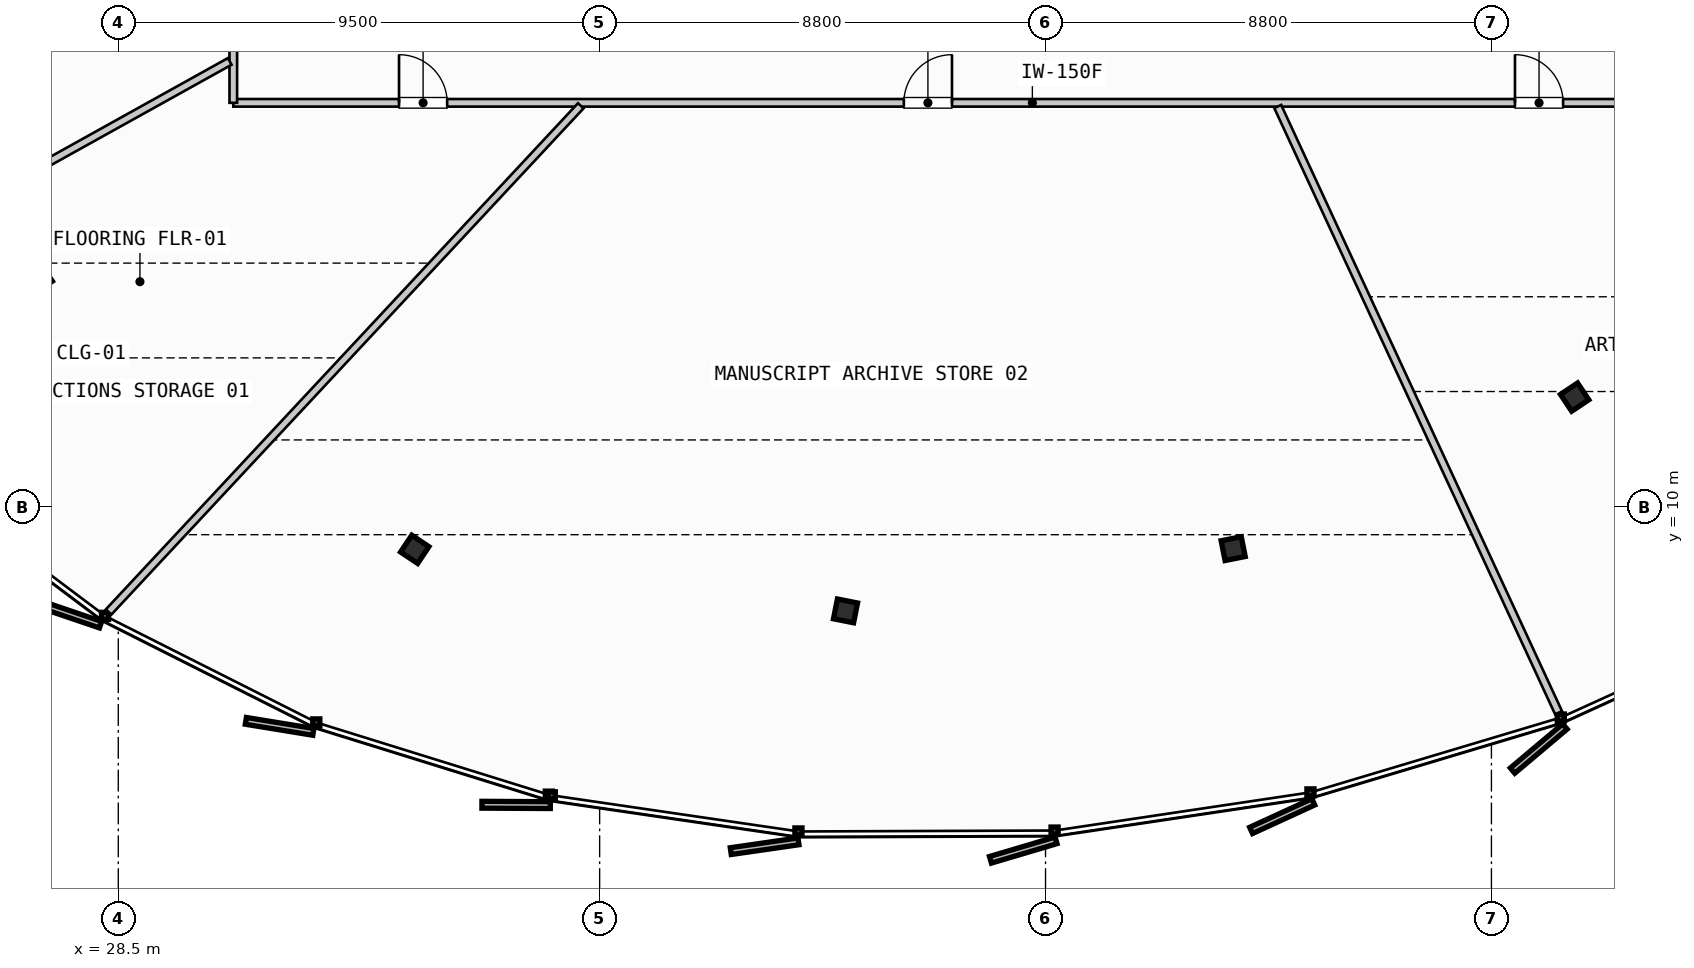
"""IFC4 building model, lengths in metres.
Left out: names, types, materials, properties, quantities, classifications, styles, units other than length and angle.
Written with IfcOpenShell. Run it as: python <this file> out.ifc"""

import sys

from ifc_helpers import new_model, si_unit, direction, frame, frame_2d, origin, origin_2d, place, context, subcontext, project, spatial, rectangle, i_section, extrude, source, transform, mapped, element, fill, save


model = new_model("IFC4")
c1 = context("Model", 3, precision=1e-05, world=origin(), true_north=direction((0.0, 1.0)))
c2 = subcontext(c1, "Body", "Model", "MODEL_VIEW")
j1 = project(units=[si_unit("LENGTHUNIT", "METRE"), si_unit("PLANEANGLEUNIT", "RADIAN")], contexts=[c1])
p1 = place(None, origin())
s1 = spatial("IfcSite", under=j1, at=p1, CompositionType="ELEMENT")
p2 = place(p1, origin())
s2 = spatial("IfcBuilding", under=s1, at=p2, CompositionType="ELEMENT")
p3 = place(p2, frame((0.0, 0.0, 85.6)))
s3 = spatial("IfcBuildingStorey", under=s2, at=p3, CompositionType="ELEMENT", Elevation=85.6)
m1 = source(origin(), c2, "Body", "SweptSolid", [
    extrude(i_section(OverallWidth=0.405, OverallDepth=0.398, WebThickness=0.035, FlangeThickness=0.056, FilletRadius=0.015, at=origin_2d()), origin(), (0.0, 0.0, 1.0), 3.35),
])
for number, where, z_axis, x_axis in (
    (1, (26.921, 14.517, 0.0), (0.0, 0.0, 1.0), (-0.831, -0.556, 0.0)),
    (2, (34.351, 9.168, 0.0), (0.0, 0.0, 1.0), (-0.556, -0.831, 0.0)),
    (3, (42.852, 7.954, 0.0), (0.0, 0.0, 1.0), (-0.195, -0.981, 0.0)),
    (4, (50.503, 9.182, 0.0), (0.0, 0.0, 1.0), (0.195, -0.981, 0.0)),
    (5, (57.242, 12.172, 0.0), (0.0, 0.0, 1.0), (0.556, -0.831, 0.0)),
):
    element("IfcColumn", number, at=place(p3, frame(where, z_axis=z_axis, x_axis=x_axis)), inside=s3, PredefinedType="COLUMN", context=c2, shape_type="MappedRepresentation", body=[
        mapped(m1, transform((0.0, 0.0, 0.0), scale=1.0)),
    ])
p4 = place(p3, frame((30.77, 17.98, 0.0), z_axis=(0.0, 0.0, 1.0), x_axis=(1.0, 0.0, 0.0)))
e6 = element("IfcWall", 6, at=p4, inside=s3, PredefinedType="PARTITIONING", context=c2, shape_type="SweptSolid", body=[
    extrude(rectangle(XDim=31.54, YDim=0.15, at=frame_2d((15.77, 0.0))), origin(), (0.0, 0.0, 1.0), 2.28),
])
p5 = place(p4, frame((3.271, 0.0, 0.0)))
e7 = element("IfcOpeningElement", 7, at=p5, cuts=e6, PredefinedType="OPENING", context=c2, shape_type="SweptSolid", body=[
    extrude(rectangle(XDim=0.95, YDim=2.15, at=frame_2d((0.475, 1.075))), frame((0.0, 0.085, 0.0), z_axis=(0.0, -1.0, 0.0), x_axis=(1.0, 0.0, 0.0)), (0.0, 0.0, 1.0), 0.17),
])
p6 = place(p4, frame((13.234, 0.0, 0.0)))
e8 = element("IfcOpeningElement", 8, at=p6, cuts=e6, PredefinedType="OPENING", context=c2, shape_type="SweptSolid", body=[
    extrude(rectangle(XDim=0.95, YDim=2.15, at=frame_2d((0.475, 1.075))), frame((0.0, 0.085, 0.0), z_axis=(0.0, -1.0, 0.0), x_axis=(1.0, 0.0, 0.0)), (0.0, 0.0, 1.0), 0.17),
])
p7 = place(p4, frame((25.295, 0.0, 0.0)))
e9 = element("IfcOpeningElement", 9, at=p7, cuts=e6, PredefinedType="OPENING", context=c2, shape_type="SweptSolid", body=[
    extrude(rectangle(XDim=0.95, YDim=2.15, at=frame_2d((0.475, 1.075))), frame((0.0, 0.085, 0.0), z_axis=(0.0, -1.0, 0.0), x_axis=(1.0, 0.0, 0.0)), (0.0, 0.0, 1.0), 0.17),
])
p8 = place(p3, frame((30.77, 38.04, 0.0), z_axis=(0.0, 0.0, 1.0), x_axis=(0.0, -1.0, 0.0)))
e10 = element("IfcWall", 10, at=p8, inside=s3, PredefinedType="PARTITIONING", context=c2, shape_type="SweptSolid", body=[
    extrude(rectangle(XDim=20.06, YDim=0.15, at=frame_2d((10.03, 0.0))), origin(), (0.0, 0.0, 1.0), 2.28),
])
p9 = place(p8, frame((11.031, 0.0, 0.0)))
e11 = element("IfcOpeningElement", 11, at=p9, cuts=e10, PredefinedType="OPENING", context=c2, shape_type="SweptSolid", body=[
    extrude(rectangle(XDim=0.95, YDim=2.15, at=frame_2d((0.475, 1.075))), frame((0.0, 0.085, 0.0), z_axis=(0.0, -1.0, 0.0), x_axis=(1.0, 0.0, 0.0)), (0.0, 0.0, 1.0), 0.17),
])
p10 = place(p3, frame((30.7, 18.797, 0.0), z_axis=(0.0, 0.0, 1.0), x_axis=(-0.874030662719, -0.485870765355, 0.0)))
e12 = element("IfcWall", 12, at=p10, inside=s3, PredefinedType="PARTITIONING", context=c2, shape_type="SweptSolid", body=[
    extrude(rectangle(XDim=10.189, YDim=0.15, at=frame_2d((5.095, 0.0))), origin(), (0.0, 0.0, 1.0), 2.28),
])
p11 = place(p3, frame((37.627, 17.921, 0.0), z_axis=(0.0, 0.0, 1.0), x_axis=(-0.682114454088, -0.73124542496, 0.0)))
e13 = element("IfcWall", 13, at=p11, inside=s3, PredefinedType="PARTITIONING", context=c2, shape_type="SweptSolid", body=[
    extrude(rectangle(XDim=13.66, YDim=0.15, at=frame_2d((6.83, 0.0))), origin(), (0.0, 0.0, 1.0), 2.28),
])
p12 = place(p3, frame((51.383, 17.907, 0.0), z_axis=(0.0, 0.0, 1.0), x_axis=(0.420357651393, -0.907358498564, 0.0)))
e14 = element("IfcWall", 14, at=p12, inside=s3, PredefinedType="PARTITIONING", context=c2, shape_type="SweptSolid", body=[
    extrude(rectangle(XDim=13.185, YDim=0.15, at=frame_2d((6.592, 0.0))), origin(), (0.0, 0.0, 1.0), 2.28),
])
m2 = source(origin(), c2, "Body", "SweptSolid", [
    extrude(rectangle(XDim=0.95, YDim=2.15, at=frame_2d((0.475, 1.075))), frame((0.0, 0.025, 0.0), z_axis=(0.0, -1.0, 0.0), x_axis=(1.0, 0.0, 0.0)), (0.0, 0.0, 1.0), 0.05),
])
p13 = place(p5, origin())
e15 = element("IfcDoor", 15, at=p13, inside=s3, OperationType="SINGLE_SWING_LEFT", PredefinedType="DOOR", context=c2, shape_type="MappedRepresentation", body=[
    mapped(m2, transform((0.0, 0.0, 0.0), scale=1.0)),
])
fill(e7, e15)
p14 = place(p6, origin())
e16 = element("IfcDoor", 16, at=p14, inside=s3, OperationType="SINGLE_SWING_RIGHT", PredefinedType="DOOR", context=c2, shape_type="MappedRepresentation", body=[
    mapped(m2, transform((0.0, 0.0, 0.0), scale=1.0)),
])
fill(e8, e16)
p15 = place(p7, origin())
e17 = element("IfcDoor", 17, at=p15, inside=s3, OperationType="SINGLE_SWING_LEFT", PredefinedType="DOOR", context=c2, shape_type="MappedRepresentation", body=[
    mapped(m2, transform((0.0, 0.0, 0.0), scale=1.0)),
])
fill(e9, e17)
save(model, sys.argv[1])
